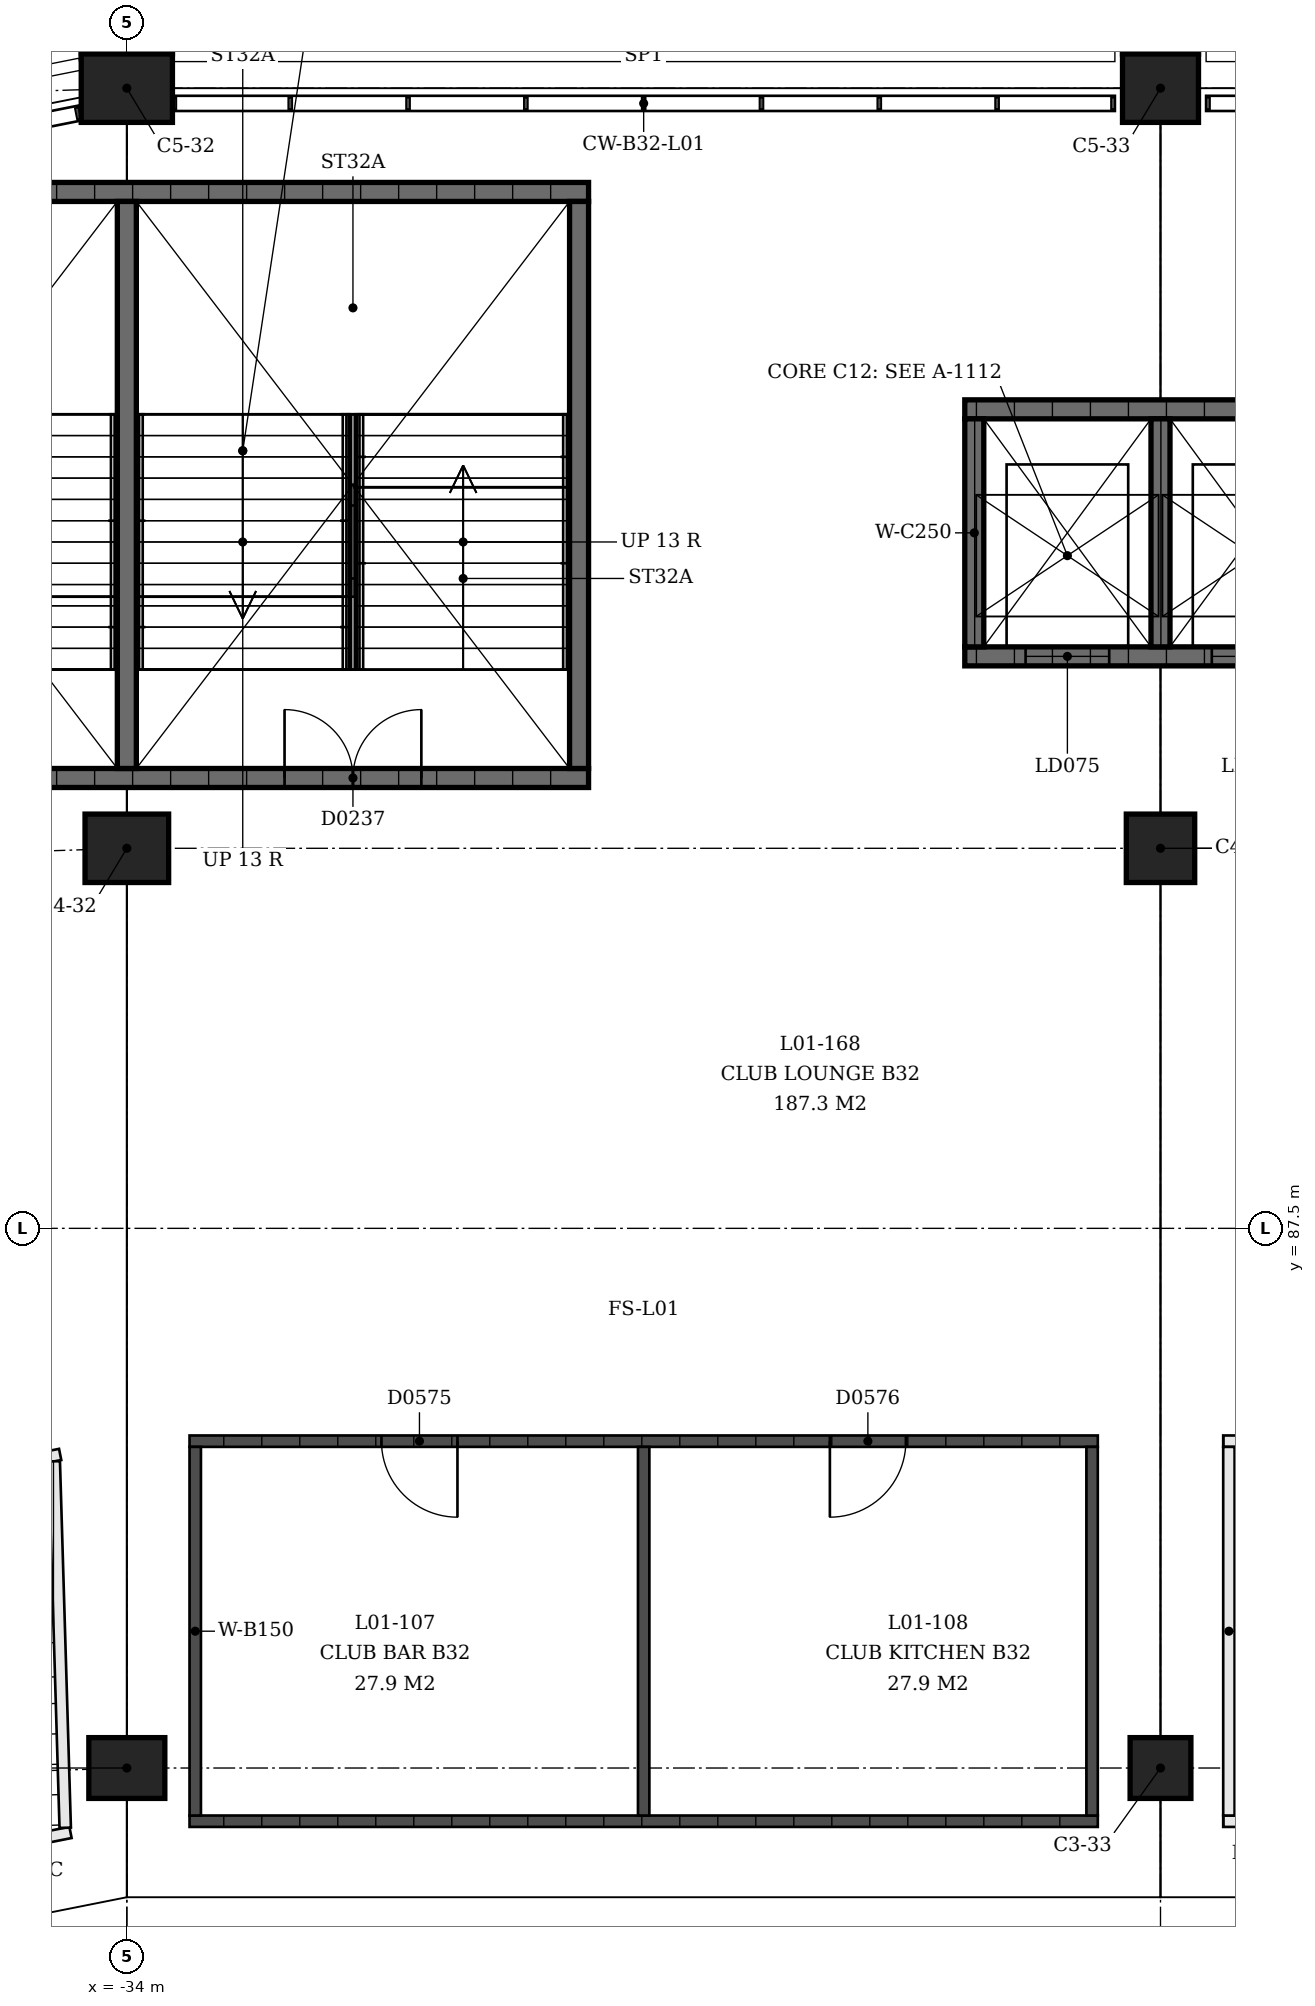
"""IFC4 building model, lengths in metres.
Left out: names, types, materials, properties, quantities, classifications, styles, units other than length and angle.
Written with IfcOpenShell. Run it as: python <this file> out.ifc"""

import sys

from ifc_helpers import new_model, si_unit, direction, frame, frame_2d, origin, origin_2d, place, context, subcontext, project, spatial, rectangle, extrude, element, fill, save


model = new_model("IFC4")
c1 = context("Model", 3, precision=1e-05, world=origin(), true_north=direction((0.0, 1.0)))
c2 = subcontext(c1, "Body", "Model", "MODEL_VIEW")
j1 = project(units=[si_unit("LENGTHUNIT", "METRE"), si_unit("PLANEANGLEUNIT", "RADIAN")], contexts=[c1])
p1 = place(None, origin())
s1 = spatial("IfcSite", under=j1, at=p1, CompositionType="ELEMENT")
p2 = place(p1, origin())
s2 = spatial("IfcBuilding", under=s1, at=p2, CompositionType="ELEMENT")
p3 = place(p2, frame((0.0, 0.0, 4.5)))
s3 = spatial("IfcBuildingStorey", under=s2, at=p3, CompositionType="ELEMENT", Elevation=4.5)
p4 = place(p3, frame((-34.0, 80.4, 0.0), z_axis=(0.0, 0.0, 1.0), x_axis=(-1.0, 0.0, 0.0)))
e1 = element("IfcColumn", 1, at=p4, inside=s3, PredefinedType="COLUMN", context=c2, shape_type="SweptSolid", body=[
    extrude(rectangle(XDim=1.0, YDim=0.8, at=origin_2d()), origin(), (0.0, 0.0, 1.0), 4.5),
])
p5 = place(p3, frame((-34.0, 92.5, 0.0), z_axis=(0.0, 0.0, 1.0), x_axis=(-1.0, 0.0, 0.0)))
e2 = element("IfcColumn", 2, at=p5, inside=s3, PredefinedType="COLUMN", context=c2, shape_type="SweptSolid", body=[
    extrude(rectangle(XDim=1.1, YDim=0.9, at=origin_2d()), origin(), (0.0, 0.0, 1.0), 4.5),
])
p6 = place(p3, frame((-34.0, 102.5, 0.0), z_axis=(0.0, 0.0, 1.0), x_axis=(-1.0, 0.0, 0.0)))
e3 = element("IfcColumn", 3, at=p6, inside=s3, PredefinedType="COLUMN", context=c2, shape_type="SweptSolid", body=[
    extrude(rectangle(XDim=1.2, YDim=0.9, at=origin_2d()), origin(), (0.0, 0.0, 1.0), 4.5),
])
p7 = place(p3, frame((-20.4, 80.4, 0.0), z_axis=(0.0, 0.0, 1.0), x_axis=(-1.0, 0.0, 0.0)))
e4 = element("IfcColumn", 4, at=p7, inside=s3, PredefinedType="COLUMN", context=c2, shape_type="SweptSolid", body=[
    extrude(rectangle(XDim=0.8, YDim=0.8, at=origin_2d()), origin(), (0.0, 0.0, 1.0), 4.5),
])
p8 = place(p3, frame((-20.4, 92.5, 0.0), z_axis=(0.0, 0.0, 1.0), x_axis=(-1.0, 0.0, 0.0)))
e5 = element("IfcColumn", 5, at=p8, inside=s3, PredefinedType="COLUMN", context=c2, shape_type="SweptSolid", body=[
    extrude(rectangle(XDim=0.9, YDim=0.9, at=origin_2d()), origin(), (0.0, 0.0, 1.0), 4.5),
])
p9 = place(p3, frame((-20.4, 102.5, 0.0), z_axis=(0.0, 0.0, 1.0), x_axis=(-1.0, 0.0, 0.0)))
e6 = element("IfcColumn", 6, at=p9, inside=s3, PredefinedType="COLUMN", context=c2, shape_type="SweptSolid", body=[
    extrude(rectangle(XDim=1.0, YDim=0.9, at=origin_2d()), origin(), (0.0, 0.0, 1.0), 4.5),
])
p10 = place(p3, frame((-27.925, 93.425, 0.0), z_axis=(0.0, 0.0, 1.0), x_axis=(-1.0, 0.0, 0.0)))
e7 = element("IfcWall", 7, at=p10, inside=s3, PredefinedType="SHEAR", context=c2, shape_type="SweptSolid", body=[
    extrude(rectangle(XDim=12.15, YDim=0.25, at=frame_2d((6.075, 0.0))), origin(), (0.0, 0.0, 1.0), 4.09),
])
p11 = place(p10, frame((2.2, 0.0, 0.0)))
e8 = element("IfcOpeningElement", 8, at=p11, cuts=e7, PredefinedType="OPENING", context=c2, shape_type="SweptSolid", body=[
    extrude(rectangle(XDim=1.8, YDim=2.1, at=frame_2d((0.9, 1.05))), frame((0.0, 0.125, 0.0), z_axis=(0.0, -1.0, 0.0), x_axis=(1.0, 0.0, 0.0)), (0.0, 0.0, 1.0), 0.25),
])
p12 = place(p10, frame((8.15, 0.0, 0.0)))
e9 = element("IfcOpeningElement", 9, at=p12, cuts=e7, PredefinedType="OPENING", context=c2, shape_type="SweptSolid", body=[
    extrude(rectangle(XDim=1.8, YDim=2.1, at=frame_2d((0.9, 1.05))), frame((0.0, 0.125, 0.0), z_axis=(0.0, -1.0, 0.0), x_axis=(1.0, 0.0, 0.0)), (0.0, 0.0, 1.0), 0.25),
])
p13 = place(p3, frame((-27.925, 101.135, 0.0), z_axis=(0.0, 0.0, 1.0), x_axis=(-1.0, 0.0, 0.0)))
e10 = element("IfcWall", 10, at=p13, inside=s3, PredefinedType="SHEAR", context=c2, shape_type="SweptSolid", body=[
    extrude(rectangle(XDim=12.15, YDim=0.25, at=frame_2d((6.075, 0.0))), origin(), (0.0, 0.0, 1.0), 4.09),
])
for number, where, z_axis, x_axis in (
    (11, (-28.05, 93.55, 0.0), (0.0, 0.0, 1.0), (0.0, 1.0, 0.0)),
    (12, (-34.0, 93.55, 0.0), (0.0, 0.0, 1.0), (0.0, 1.0, 0.0)),
):
    element("IfcWall", number, at=place(p3, frame(where, z_axis=z_axis, x_axis=x_axis)), inside=s3, PredefinedType="SHEAR", context=c2, shape_type="SweptSolid", body=[
        extrude(rectangle(XDim=7.46, YDim=0.25, at=frame_2d((3.73, 0.0))), origin(), (0.0, 0.0, 1.0), 4.09),
    ])
p14 = place(p3, frame((-17.825, 95.025, 0.0), z_axis=(0.0, 0.0, 1.0), x_axis=(-1.0, 0.0, 0.0)))
e13 = element("IfcWall", 13, at=p14, inside=s3, PredefinedType="SHEAR", context=c2, shape_type="SweptSolid", body=[
    extrude(rectangle(XDim=5.15, YDim=0.25, at=frame_2d((2.575, 0.0))), origin(), (0.0, 0.0, 1.0), 4.09),
])
p15 = place(p14, frame((0.8, 0.0, 0.0)))
e14 = element("IfcOpeningElement", 14, at=p15, cuts=e13, PredefinedType="OPENING", context=c2, shape_type="SweptSolid", body=[
    extrude(rectangle(XDim=1.1, YDim=2.1, at=frame_2d((0.55, 1.05))), frame((0.0, 0.125, 0.0), z_axis=(0.0, -1.0, 0.0), x_axis=(1.0, 0.0, 0.0)), (0.0, 0.0, 1.0), 0.25),
])
p16 = place(p14, frame((3.25, 0.0, 0.0)))
e15 = element("IfcOpeningElement", 15, at=p16, cuts=e13, PredefinedType="OPENING", context=c2, shape_type="SweptSolid", body=[
    extrude(rectangle(XDim=1.1, YDim=2.1, at=frame_2d((0.55, 1.05))), frame((0.0, 0.125, 0.0), z_axis=(0.0, -1.0, 0.0), x_axis=(1.0, 0.0, 0.0)), (0.0, 0.0, 1.0), 0.25),
])
p17 = place(p3, frame((-17.825, 98.275, 0.0), z_axis=(0.0, 0.0, 1.0), x_axis=(-1.0, 0.0, 0.0)))
e16 = element("IfcWall", 16, at=p17, inside=s3, PredefinedType="SHEAR", context=c2, shape_type="SweptSolid", body=[
    extrude(rectangle(XDim=5.15, YDim=0.25, at=frame_2d((2.575, 0.0))), origin(), (0.0, 0.0, 1.0), 4.09),
])
for number, where, z_axis, x_axis in (
    (17, (-22.85, 95.15, 0.0), (0.0, 0.0, 1.0), (0.0, 1.0, 0.0)),
    (18, (-20.4, 95.15, 0.0), (0.0, 0.0, 1.0), (0.0, 1.0, 0.0)),
):
    element("IfcWall", number, at=place(p3, frame(where, z_axis=z_axis, x_axis=x_axis)), inside=s3, PredefinedType="SHEAR", context=c2, shape_type="SweptSolid", body=[
        extrude(rectangle(XDim=3.0, YDim=0.25, at=frame_2d((1.5, 0.0))), origin(), (0.0, 0.0, 1.0), 4.09),
    ])
p18 = place(p3, frame((-34.741, 79.552, 0.0), z_axis=(0.0, 0.0, 1.0), x_axis=(-0.980786464492, -0.195084369103, 0.0)))
e19 = element("IfcWall", 19, at=p18, inside=s3, PredefinedType="PARTITIONING", context=c2, shape_type="SweptSolid", body=[
    extrude(rectangle(XDim=9.102, YDim=0.15, at=frame_2d((4.551, 0.0))), origin(), (0.0, 0.0, 1.0), 3.0),
])
p19 = place(p3, frame((-34.877, 84.525, 0.0), z_axis=(0.0, 0.0, 1.0), x_axis=(-0.98078580384, -0.195087690502, 0.0)))
e20 = element("IfcWall", 20, at=p19, inside=s3, PredefinedType="PARTITIONING", context=c2, shape_type="SweptSolid", body=[
    extrude(rectangle(XDim=10.775, YDim=0.15, at=frame_2d((5.387, 0.0))), origin(), (0.0, 0.0, 1.0), 3.0),
])
p20 = place(p19, frame((1.276, 0.0, 0.0)))
e21 = element("IfcOpeningElement", 21, at=p20, cuts=e20, PredefinedType="OPENING", context=c2, shape_type="SweptSolid", body=[
    extrude(rectangle(XDim=0.9, YDim=2.1, at=frame_2d((0.45, 1.05))), frame((0.0, 0.075, 0.0), z_axis=(0.0, -1.0, 0.0), x_axis=(1.0, 0.0, 0.0)), (0.0, 0.0, 1.0), 0.15),
])
p21 = place(p19, frame((4.566, 0.0, 0.0)))
e22 = element("IfcOpeningElement", 22, at=p21, cuts=e20, PredefinedType="OPENING", context=c2, shape_type="SweptSolid", body=[
    extrude(rectangle(XDim=0.9, YDim=2.1, at=frame_2d((0.45, 1.05))), frame((0.0, 0.075, 0.0), z_axis=(0.0, -1.0, 0.0), x_axis=(1.0, 0.0, 0.0)), (0.0, 0.0, 1.0), 0.15),
])
p22 = place(p19, frame((7.119, 0.0, 0.0)))
e23 = element("IfcOpeningElement", 23, at=p22, cuts=e20, PredefinedType="OPENING", context=c2, shape_type="SweptSolid", body=[
    extrude(rectangle(XDim=1.1, YDim=2.1, at=frame_2d((0.55, 1.05))), frame((0.0, 0.075, 0.0), z_axis=(0.0, -1.0, 0.0), x_axis=(1.0, 0.0, 0.0)), (0.0, 0.0, 1.0), 0.15),
])
p23 = place(p19, frame((9.135, 0.0, 0.0)))
e24 = element("IfcOpeningElement", 24, at=p23, cuts=e20, PredefinedType="OPENING", context=c2, shape_type="SweptSolid", body=[
    extrude(rectangle(XDim=1.1, YDim=2.1, at=frame_2d((0.55, 1.05))), frame((0.0, 0.075, 0.0), z_axis=(0.0, -1.0, 0.0), x_axis=(1.0, 0.0, 0.0)), (0.0, 0.0, 1.0), 0.15),
])
p24 = place(p3, frame((-34.811, 79.614, 0.0), z_axis=(0.0, 0.0, 1.0), x_axis=(-0.02991368842, 0.999552485488, 0.0)))
e25 = element("IfcWall", 25, at=p24, inside=s3, PredefinedType="PARTITIONING", context=c2, shape_type="SweptSolid", body=[
    extrude(rectangle(XDim=4.823, YDim=0.15, at=frame_2d((2.412, 0.0))), origin(), (0.0, 0.0, 1.0), 3.0),
])
p25 = place(p3, frame((-33.175, 79.7, 0.0), z_axis=(0.0, 0.0, 1.0), x_axis=(1.0, 0.0, 0.0)))
e26 = element("IfcWall", 26, at=p25, inside=s3, PredefinedType="SOLIDWALL", context=c2, shape_type="SweptSolid", body=[
    extrude(rectangle(XDim=11.95, YDim=0.15, at=frame_2d((5.975, 0.0))), origin(), (0.0, 0.0, 1.0), 3.0),
])
p26 = place(p3, frame((-33.175, 84.7, 0.0), z_axis=(0.0, 0.0, 1.0), x_axis=(1.0, 0.0, 0.0)))
e27 = element("IfcWall", 27, at=p26, inside=s3, PredefinedType="SOLIDWALL", context=c2, shape_type="SweptSolid", body=[
    extrude(rectangle(XDim=11.95, YDim=0.15, at=frame_2d((5.975, 0.0))), origin(), (0.0, 0.0, 1.0), 3.0),
])
p27 = place(p26, frame((2.525, 0.0, 0.0)))
e28 = element("IfcOpeningElement", 28, at=p27, cuts=e27, PredefinedType="OPENING", context=c2, shape_type="SweptSolid", body=[
    extrude(rectangle(XDim=1.0, YDim=2.1, at=frame_2d((0.5, 1.05))), frame((0.0, 0.075, 0.0), z_axis=(0.0, -1.0, 0.0), x_axis=(1.0, 0.0, 0.0)), (0.0, 0.0, 1.0), 0.15),
])
p28 = place(p26, frame((8.425, 0.0, 0.0)))
e29 = element("IfcOpeningElement", 29, at=p28, cuts=e27, PredefinedType="OPENING", context=c2, shape_type="SweptSolid", body=[
    extrude(rectangle(XDim=1.0, YDim=2.1, at=frame_2d((0.5, 1.05))), frame((0.0, 0.075, 0.0), z_axis=(0.0, -1.0, 0.0), x_axis=(1.0, 0.0, 0.0)), (0.0, 0.0, 1.0), 0.15),
])
for number, where, z_axis, x_axis in (
    (30, (-33.1, 79.775, 0.0), (0.0, 0.0, 1.0), (0.0, 1.0, 0.0)),
    (31, (-27.2, 79.775, 0.0), (0.0, 0.0, 1.0), (0.0, 1.0, 0.0)),
    (32, (-21.3, 79.775, 0.0), (0.0, 0.0, 1.0), (0.0, 1.0, 0.0)),
):
    element("IfcWall", number, at=place(p3, frame(where, z_axis=z_axis, x_axis=x_axis)), inside=s3, PredefinedType="SOLIDWALL", context=c2, shape_type="SweptSolid", body=[
        extrude(rectangle(XDim=4.85, YDim=0.15, at=frame_2d((2.425, 0.0))), origin(), (0.0, 0.0, 1.0), 3.0),
    ])
p29 = place(p3, frame((-7.625, 79.7, 0.0), z_axis=(0.0, 0.0, 1.0), x_axis=(-1.0, 0.0, 0.0)))
e33 = element("IfcWall", 33, at=p29, inside=s3, PredefinedType="PARTITIONING", context=c2, shape_type="SweptSolid", body=[
    extrude(rectangle(XDim=11.95, YDim=0.15, at=frame_2d((5.975, 0.0))), origin(), (0.0, 0.0, 1.0), 3.0),
])
p30 = place(p3, frame((-7.625, 84.7, 0.0), z_axis=(0.0, 0.0, 1.0), x_axis=(-1.0, 0.0, 0.0)))
e34 = element("IfcWall", 34, at=p30, inside=s3, PredefinedType="PARTITIONING", context=c2, shape_type="SweptSolid", body=[
    extrude(rectangle(XDim=11.95, YDim=0.15, at=frame_2d((5.975, 0.0))), origin(), (0.0, 0.0, 1.0), 3.0),
])
p31 = place(p30, frame((1.454, 0.0, 0.0)))
e35 = element("IfcOpeningElement", 35, at=p31, cuts=e34, PredefinedType="OPENING", context=c2, shape_type="SweptSolid", body=[
    extrude(rectangle(XDim=0.9, YDim=2.1, at=frame_2d((0.45, 1.05))), frame((0.0, 0.075, 0.0), z_axis=(0.0, -1.0, 0.0), x_axis=(1.0, 0.0, 0.0)), (0.0, 0.0, 1.0), 0.15),
])
p32 = place(p30, frame((5.112, 0.0, 0.0)))
e36 = element("IfcOpeningElement", 36, at=p32, cuts=e34, PredefinedType="OPENING", context=c2, shape_type="SweptSolid", body=[
    extrude(rectangle(XDim=0.9, YDim=2.1, at=frame_2d((0.45, 1.05))), frame((0.0, 0.075, 0.0), z_axis=(0.0, -1.0, 0.0), x_axis=(1.0, 0.0, 0.0)), (0.0, 0.0, 1.0), 0.15),
])
p33 = place(p30, frame((7.962, 0.0, 0.0)))
e37 = element("IfcOpeningElement", 37, at=p33, cuts=e34, PredefinedType="OPENING", context=c2, shape_type="SweptSolid", body=[
    extrude(rectangle(XDim=1.1, YDim=2.1, at=frame_2d((0.55, 1.05))), frame((0.0, 0.075, 0.0), z_axis=(0.0, -1.0, 0.0), x_axis=(1.0, 0.0, 0.0)), (0.0, 0.0, 1.0), 0.15),
])
p34 = place(p30, frame((10.204, 0.0, 0.0)))
e38 = element("IfcOpeningElement", 38, at=p34, cuts=e34, PredefinedType="OPENING", context=c2, shape_type="SweptSolid", body=[
    extrude(rectangle(XDim=1.1, YDim=2.1, at=frame_2d((0.55, 1.05))), frame((0.0, 0.075, 0.0), z_axis=(0.0, -1.0, 0.0), x_axis=(1.0, 0.0, 0.0)), (0.0, 0.0, 1.0), 0.15),
])
p35 = place(p3, frame((-19.5, 79.775, 0.0), z_axis=(0.0, 0.0, 1.0), x_axis=(0.0, 1.0, 0.0)))
e39 = element("IfcWall", 39, at=p35, inside=s3, PredefinedType="PARTITIONING", context=c2, shape_type="SweptSolid", body=[
    extrude(rectangle(XDim=4.85, YDim=0.15, at=frame_2d((2.425, 0.0))), origin(), (0.0, 0.0, 1.0), 3.0),
])
p36 = place(p11, origin())
e40 = element("IfcDoor", 40, at=p36, inside=s3, OperationType="DOUBLE_DOOR_SINGLE_SWING", PredefinedType="DOOR", context=c2, shape_type="SweptSolid", body=[
    extrude(rectangle(XDim=1.8, YDim=2.1, at=frame_2d((0.9, 1.05))), frame((0.0, 0.025, 0.0), z_axis=(0.0, -1.0, 0.0), x_axis=(1.0, 0.0, 0.0)), (0.0, 0.0, 1.0), 0.05),
])
fill(e8, e40)
p37 = place(p15, origin())
e41 = element("IfcDoor", 41, at=p37, inside=s3, OperationType="SLIDING_TO_LEFT", PredefinedType="DOOR", context=c2, shape_type="SweptSolid", body=[
    extrude(rectangle(XDim=1.1, YDim=2.1, at=frame_2d((0.55, 1.05))), frame((0.0, 0.025, 0.0), z_axis=(0.0, -1.0, 0.0), x_axis=(1.0, 0.0, 0.0)), (0.0, 0.0, 1.0), 0.05),
])
fill(e14, e41)
p38 = place(p16, origin())
e42 = element("IfcDoor", 42, at=p38, inside=s3, OperationType="SLIDING_TO_LEFT", PredefinedType="DOOR", context=c2, shape_type="SweptSolid", body=[
    extrude(rectangle(XDim=1.1, YDim=2.1, at=frame_2d((0.55, 1.05))), frame((0.0, 0.025, 0.0), z_axis=(0.0, -1.0, 0.0), x_axis=(1.0, 0.0, 0.0)), (0.0, 0.0, 1.0), 0.05),
])
fill(e15, e42)
p39 = place(p27, origin())
e43 = element("IfcDoor", 43, at=p39, inside=s3, OperationType="SINGLE_SWING_RIGHT", PredefinedType="DOOR", context=c2, shape_type="SweptSolid", body=[
    extrude(rectangle(XDim=1.0, YDim=2.1, at=frame_2d((0.5, 1.05))), frame((0.0, 0.025, 0.0), z_axis=(0.0, -1.0, 0.0), x_axis=(1.0, 0.0, 0.0)), (0.0, 0.0, 1.0), 0.05),
])
fill(e28, e43)
p40 = place(p28, origin())
e44 = element("IfcDoor", 44, at=p40, inside=s3, OperationType="SINGLE_SWING_LEFT", PredefinedType="DOOR", context=c2, shape_type="SweptSolid", body=[
    extrude(rectangle(XDim=1.0, YDim=2.1, at=frame_2d((0.5, 1.05))), frame((0.0, 0.025, 0.0), z_axis=(0.0, -1.0, 0.0), x_axis=(1.0, 0.0, 0.0)), (0.0, 0.0, 1.0), 0.05),
])
fill(e29, e44)
save(model, sys.argv[1])
